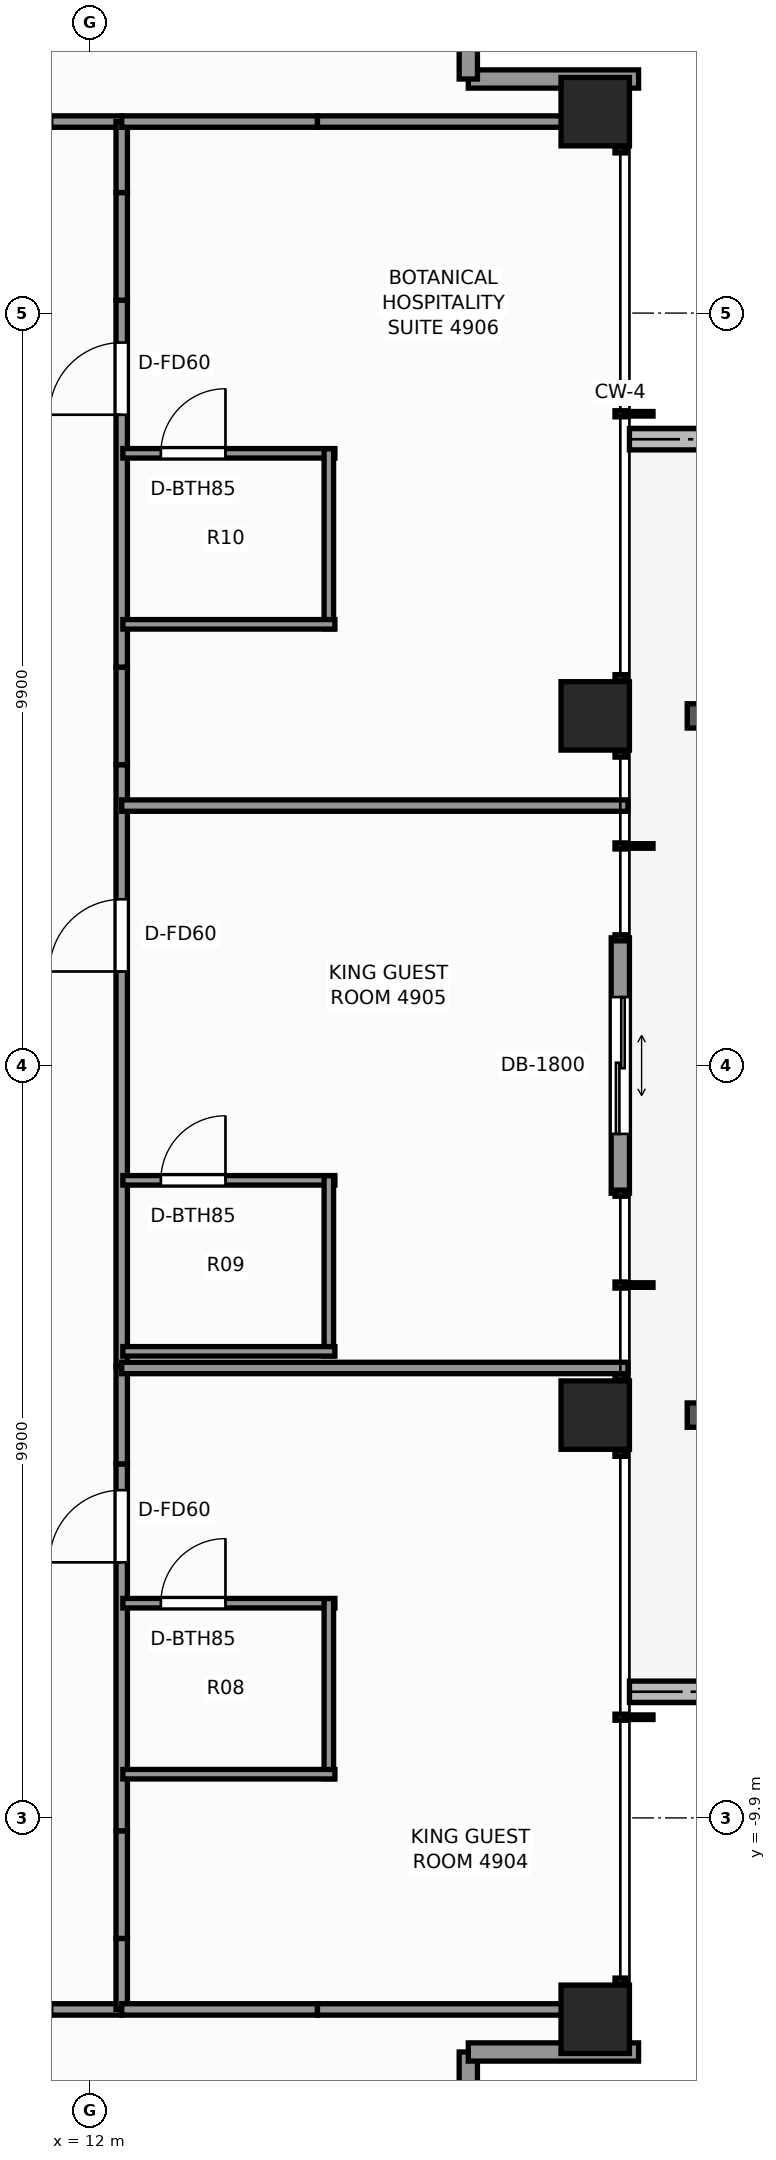
"""IFC4 building model, lengths in metres.
Left out: names, types, materials, properties, quantities, classifications, styles, units other than length and angle.
Written with IfcOpenShell. Run it as: python <this file> out.ifc"""

import sys

from ifc_helpers import new_model, si_unit, direction, frame, frame_2d, origin, origin_2d, place, context, subcontext, project, spatial, rectangle, extrude, element, fill, save


model = new_model("IFC4")
c1 = context("Model", 3, precision=1e-05, world=origin(), true_north=direction((0.0, 1.0)))
c2 = subcontext(c1, "Body", "Model", "MODEL_VIEW")
j1 = project(units=[si_unit("LENGTHUNIT", "METRE"), si_unit("PLANEANGLEUNIT", "RADIAN")], contexts=[c1])
p1 = place(None, origin())
s1 = spatial("IfcSite", under=j1, at=p1, CompositionType="ELEMENT")
p2 = place(p1, origin())
s2 = spatial("IfcBuilding", under=s1, at=p2, CompositionType="ELEMENT")
p3 = place(p2, frame((0.0, 0.0, 170.1)))
s3 = spatial("IfcBuildingStorey", under=s2, at=p3, CompositionType="ELEMENT", Elevation=170.1)
for number, where, z_axis, x_axis in (
    (1, (18.65, -12.55, 0.0), (0.0, 0.0, 1.0), (1.0, 0.0, 0.0)),
    (2, (18.65, -4.6, 0.0), (0.0, 0.0, 1.0), (1.0, 0.0, 0.0)),
    (3, (18.65, 4.6, 0.0), (0.0, 0.0, 1.0), (1.0, 0.0, 0.0)),
    (4, (18.65, 12.55, 0.0), (0.0, 0.0, 1.0), (1.0, 0.0, 0.0)),
):
    element("IfcColumn", number, at=place(p3, frame(where, z_axis=z_axis, x_axis=x_axis)), inside=s3, PredefinedType="COLUMN", context=c2, shape_type="SweptSolid", body=[
        extrude(rectangle(XDim=0.9, YDim=0.9, at=origin_2d()), origin(), (0.0, 0.0, 1.0), 3.3),
    ])
p4 = place(p3, frame((22.075, 8.24, -0.02), z_axis=(0.0, 0.0, 1.0), x_axis=(-1.0, 0.0, 0.0)))
e5 = element("IfcWall", 5, at=p4, inside=s3, PredefinedType="PARAPET", context=c2, shape_type="SweptSolid", body=[
    extrude(rectangle(XDim=2.975, YDim=0.28, at=frame_2d((1.487, 0.0))), origin(), (0.0, 0.0, 1.0), 0.42),
])
p5 = place(p3, frame((19.1, -8.24, -0.02), z_axis=(0.0, 0.0, 1.0), x_axis=(1.0, 0.0, 0.0)))
e6 = element("IfcWall", 6, at=p5, inside=s3, PredefinedType="PARAPET", context=c2, shape_type="SweptSolid", body=[
    extrude(rectangle(XDim=3.42, YDim=0.28, at=frame_2d((1.71, 0.0))), origin(), (0.0, 0.0, 1.0), 0.42),
])
for number, where, z_axis, x_axis in (
    (7, (16.98, -12.98, 0.0), (0.0, 0.0, 1.0), (0.0, -1.0, 0.0)),
    (8, (19.22, -12.98, 0.0), (0.0, 0.0, 1.0), (-1.0, 0.0, 0.0)),
):
    element("IfcWall", number, at=place(p3, frame(where, z_axis=z_axis, x_axis=x_axis)), inside=s3, PredefinedType="STANDARD", context=c2, shape_type="SweptSolid", body=[
        extrude(rectangle(XDim=2.24, YDim=0.24, at=frame_2d((1.12, 0.0))), origin(), (0.0, 0.0, 1.0), 1.275),
    ])
p6 = place(p3, frame((18.98, 1.68, 0.0), z_axis=(0.0, 0.0, 1.0), x_axis=(0.0, -1.0, 0.0)))
e9 = element("IfcWall", 9, at=p6, inside=s3, PredefinedType="STANDARD", context=c2, shape_type="SweptSolid", body=[
    extrude(rectangle(XDim=3.36, YDim=0.24, at=frame_2d((1.68, 0.0))), origin(), (0.0, 0.0, 1.0), 2.615),
])
p7 = place(p6, frame((0.78, 0.0, 0.0)))
e10 = element("IfcOpeningElement", 10, at=p7, cuts=e9, PredefinedType="OPENING", context=c2, shape_type="SweptSolid", body=[
    extrude(rectangle(XDim=1.8, YDim=2.2, at=frame_2d((0.9, 1.1))), frame((0.0, 0.13, 0.0), z_axis=(0.0, -1.0, 0.0), x_axis=(1.0, 0.0, 0.0)), (0.0, 0.0, 1.0), 0.26),
])
for number, where, z_axis, x_axis in (
    (11, (16.98, 12.98, 0.0), (0.0, 0.0, 1.0), (1.0, 0.0, 0.0)),
    (12, (16.98, 15.22, 0.0), (0.0, 0.0, 1.0), (0.0, -1.0, 0.0)),
):
    element("IfcWall", number, at=place(p3, frame(where, z_axis=z_axis, x_axis=x_axis)), inside=s3, PredefinedType="STANDARD", context=c2, shape_type="SweptSolid", body=[
        extrude(rectangle(XDim=2.24, YDim=0.24, at=frame_2d((1.12, 0.0))), origin(), (0.0, 0.0, 1.0), 1.275),
    ])
for number, where, z_axis, x_axis in (
    (13, (11.486, -12.42, 0.0), (0.0, 0.0, 1.0), (1.0, 0.0, 0.0)),
    (14, (11.486, 12.42, 0.0), (0.0, 0.0, 1.0), (1.0, 0.0, 0.0)),
    (15, (12.42, -12.42, 0.0), (0.0, 0.0, 1.0), (0.0, 1.0, 0.0)),
):
    element("IfcWall", number, at=place(p3, frame(where, z_axis=z_axis, x_axis=x_axis)), inside=s3, PredefinedType="PARTITIONING", context=c2, shape_type="SweptSolid", body=[
        extrude(rectangle(XDim=0.934, YDim=0.15, at=frame_2d((0.467, 0.0))), origin(), (0.0, 0.0, 1.0), 3.08),
    ])
p8 = place(p3, frame((12.42, -11.486, 0.0), z_axis=(0.0, 0.0, 1.0), x_axis=(0.0, 1.0, 0.0)))
e16 = element("IfcWall", 16, at=p8, inside=s3, PredefinedType="PARTITIONING", context=c2, shape_type="SweptSolid", body=[
    extrude(rectangle(XDim=1.417, YDim=0.15, at=frame_2d((0.708, 0.0))), origin(), (0.0, 0.0, 1.0), 1.265),
])
p9 = place(p3, frame((12.42, -10.069, 0.0), z_axis=(0.0, 0.0, 1.0), x_axis=(0.0, 1.0, 0.0)))
e17 = element("IfcWall", 17, at=p9, inside=s3, PredefinedType="PARTITIONING", context=c2, shape_type="SweptSolid", body=[
    extrude(rectangle(XDim=4.827, YDim=0.15, at=frame_2d((2.414, 0.0))), origin(), (0.0, 0.0, 1.0), 3.08),
])
p10 = place(p9, frame((3.532, 0.0, 0.0)))
e18 = element("IfcOpeningElement", 18, at=p10, cuts=e17, PredefinedType="OPENING", context=c2, shape_type="SweptSolid", body=[
    extrude(rectangle(XDim=0.95, YDim=2.06, at=frame_2d((0.475, 1.03))), frame((0.0, 0.085, 0.0), z_axis=(0.0, -1.0, 0.0), x_axis=(1.0, 0.0, 0.0)), (0.0, 0.0, 1.0), 0.17),
])
p11 = place(p3, frame((12.42, -5.242, 0.0), z_axis=(0.0, 0.0, 1.0), x_axis=(0.0, 1.0, 0.0)))
e19 = element("IfcWall", 19, at=p11, inside=s3, PredefinedType="PARTITIONING", context=c2, shape_type="SweptSolid", body=[
    extrude(rectangle(XDim=1.284, YDim=0.15, at=frame_2d((0.642, 0.0))), origin(), (0.0, 0.0, 1.0), 1.265),
])
p12 = place(p3, frame((12.42, -3.958, 0.0), z_axis=(0.0, 0.0, 1.0), x_axis=(0.0, 1.0, 0.0)))
e20 = element("IfcWall", 20, at=p12, inside=s3, PredefinedType="PARTITIONING", context=c2, shape_type="SweptSolid", body=[
    extrude(rectangle(XDim=7.916, YDim=0.15, at=frame_2d((3.958, 0.0))), origin(), (0.0, 0.0, 1.0), 2.605),
])
p13 = place(p12, frame((5.195, 0.0, 0.0)))
e21 = element("IfcOpeningElement", 21, at=p13, cuts=e20, PredefinedType="OPENING", context=c2, shape_type="SweptSolid", body=[
    extrude(rectangle(XDim=0.95, YDim=2.06, at=frame_2d((0.475, 1.03))), frame((0.0, 0.085, 0.0), z_axis=(0.0, -1.0, 0.0), x_axis=(1.0, 0.0, 0.0)), (0.0, 0.0, 1.0), 0.17),
])
p14 = place(p3, frame((12.42, 3.958, 0.0), z_axis=(0.0, 0.0, 1.0), x_axis=(0.0, 1.0, 0.0)))
e22 = element("IfcWall", 22, at=p14, inside=s3, PredefinedType="PARTITIONING", context=c2, shape_type="SweptSolid", body=[
    extrude(rectangle(XDim=1.284, YDim=0.15, at=frame_2d((0.642, 0.0))), origin(), (0.0, 0.0, 1.0), 1.265),
])
p15 = place(p3, frame((12.42, 5.242, 0.0), z_axis=(0.0, 0.0, 1.0), x_axis=(0.0, 1.0, 0.0)))
e23 = element("IfcWall", 23, at=p15, inside=s3, PredefinedType="PARTITIONING", context=c2, shape_type="SweptSolid", body=[
    extrude(rectangle(XDim=4.827, YDim=0.15, at=frame_2d((2.414, 0.0))), origin(), (0.0, 0.0, 1.0), 3.08),
])
p16 = place(p15, frame((3.321, 0.0, 0.0)))
e24 = element("IfcOpeningElement", 24, at=p16, cuts=e23, PredefinedType="OPENING", context=c2, shape_type="SweptSolid", body=[
    extrude(rectangle(XDim=0.95, YDim=2.06, at=frame_2d((0.475, 1.03))), frame((0.0, 0.085, 0.0), z_axis=(0.0, -1.0, 0.0), x_axis=(1.0, 0.0, 0.0)), (0.0, 0.0, 1.0), 0.17),
])
p17 = place(p3, frame((12.42, 10.069, 0.0), z_axis=(0.0, 0.0, 1.0), x_axis=(0.0, 1.0, 0.0)))
e25 = element("IfcWall", 25, at=p17, inside=s3, PredefinedType="PARTITIONING", context=c2, shape_type="SweptSolid", body=[
    extrude(rectangle(XDim=1.417, YDim=0.15, at=frame_2d((0.708, 0.0))), origin(), (0.0, 0.0, 1.0), 1.265),
])
p18 = place(p3, frame((12.42, 11.486, 0.0), z_axis=(0.0, 0.0, 1.0), x_axis=(0.0, 1.0, 0.0)))
e26 = element("IfcWall", 26, at=p18, inside=s3, PredefinedType="PARTITIONING", context=c2, shape_type="SweptSolid", body=[
    extrude(rectangle(XDim=0.934, YDim=0.15, at=frame_2d((0.467, 0.0))), origin(), (0.0, 0.0, 1.0), 3.08),
])
p19 = place(p3, frame((12.42, -12.42, 0.0), z_axis=(0.0, 0.0, 1.0), x_axis=(1.0, 0.0, 0.0)))
e27 = element("IfcWall", 27, at=p19, inside=s3, PredefinedType="PARTITIONING", context=c2, shape_type="SweptSolid", body=[
    extrude(rectangle(XDim=2.575, YDim=0.15, at=frame_2d((1.288, 0.0))), origin(), (0.0, 0.0, 1.0), 3.08),
])
p20 = place(p3, frame((14.995, -12.42, 0.0), z_axis=(0.0, 0.0, 1.0), x_axis=(1.0, 0.0, 0.0)))
e28 = element("IfcWall", 28, at=p20, inside=s3, PredefinedType="PARTITIONING", context=c2, shape_type="SweptSolid", body=[
    extrude(rectangle(XDim=4.085, YDim=0.15, at=frame_2d((2.042, 0.0))), origin(), (0.0, 0.0, 1.0), 1.265),
])
p21 = place(p3, frame((12.42, 12.42, 0.0), z_axis=(0.0, 0.0, 1.0), x_axis=(1.0, 0.0, 0.0)))
e29 = element("IfcWall", 29, at=p21, inside=s3, PredefinedType="PARTITIONING", context=c2, shape_type="SweptSolid", body=[
    extrude(rectangle(XDim=2.575, YDim=0.15, at=frame_2d((1.288, 0.0))), origin(), (0.0, 0.0, 1.0), 3.08),
])
p22 = place(p3, frame((14.995, 12.42, 0.0), z_axis=(0.0, 0.0, 1.0), x_axis=(1.0, 0.0, 0.0)))
e30 = element("IfcWall", 30, at=p22, inside=s3, PredefinedType="PARTITIONING", context=c2, shape_type="SweptSolid", body=[
    extrude(rectangle(XDim=4.085, YDim=0.15, at=frame_2d((2.042, 0.0))), origin(), (0.0, 0.0, 1.0), 1.265),
])
p23 = place(p3, frame((12.42, -3.98, 0.0), z_axis=(0.0, 0.0, 1.0), x_axis=(1.0, 0.0, 0.0)))
e31 = element("IfcWall", 31, at=p23, inside=s3, PredefinedType="PARTITIONING", context=c2, shape_type="SweptSolid", body=[
    extrude(rectangle(XDim=6.66, YDim=0.15, at=frame_2d((3.33, 0.0))), origin(), (0.0, 0.0, 1.0), 1.265),
])
p24 = place(p3, frame((12.435, -7.075, 0.0), z_axis=(0.0, 0.0, 1.0), x_axis=(1.0, 0.0, 0.0)))
e32 = element("IfcWall", 32, at=p24, inside=s3, PredefinedType="PARTITIONING", context=c2, shape_type="SweptSolid", body=[
    extrude(rectangle(XDim=2.79, YDim=0.125, at=frame_2d((1.395, 0.0))), origin(), (0.0, 0.0, 1.0), 3.08),
])
p25 = place(p24, frame((0.5, 0.0, 0.0)))
e33 = element("IfcOpeningElement", 33, at=p25, cuts=e32, PredefinedType="OPENING", context=c2, shape_type="SweptSolid", body=[
    extrude(rectangle(XDim=0.85, YDim=2.03, at=frame_2d((0.425, 1.015))), frame((0.0, 0.073, 0.0), z_axis=(0.0, -1.0, 0.0), x_axis=(1.0, 0.0, 0.0)), (0.0, 0.0, 1.0), 0.145),
])
p26 = place(p3, frame((15.145, -9.385, 0.0), z_axis=(0.0, 0.0, 1.0), x_axis=(0.0, 1.0, 0.0)))
e34 = element("IfcWall", 34, at=p26, inside=s3, PredefinedType="PARTITIONING", context=c2, shape_type="SweptSolid", body=[
    extrude(rectangle(XDim=2.37, YDim=0.125, at=frame_2d((1.185, 0.0))), origin(), (0.0, 0.0, 1.0), 3.08),
])
p27 = place(p3, frame((12.435, -9.325, 0.0), z_axis=(0.0, 0.0, 1.0), x_axis=(1.0, 0.0, 0.0)))
e35 = element("IfcWall", 35, at=p27, inside=s3, PredefinedType="PARTITIONING", context=c2, shape_type="SweptSolid", body=[
    extrude(rectangle(XDim=2.79, YDim=0.125, at=frame_2d((1.395, 0.0))), origin(), (0.0, 0.0, 1.0), 3.08),
])
p28 = place(p3, frame((12.42, 3.42, 0.0), z_axis=(0.0, 0.0, 1.0), x_axis=(1.0, 0.0, 0.0)))
e36 = element("IfcWall", 36, at=p28, inside=s3, PredefinedType="PARTITIONING", context=c2, shape_type="SweptSolid", body=[
    extrude(rectangle(XDim=6.66, YDim=0.15, at=frame_2d((3.33, 0.0))), origin(), (0.0, 0.0, 1.0), 3.08),
])
p29 = place(p3, frame((12.435, -1.511, 0.0), z_axis=(0.0, 0.0, 1.0), x_axis=(1.0, 0.0, 0.0)))
e37 = element("IfcWall", 37, at=p29, inside=s3, PredefinedType="PARTITIONING", context=c2, shape_type="SweptSolid", body=[
    extrude(rectangle(XDim=2.79, YDim=0.125, at=frame_2d((1.395, 0.0))), origin(), (0.0, 0.0, 1.0), 3.08),
])
p30 = place(p29, frame((0.5, 0.0, 0.0)))
e38 = element("IfcOpeningElement", 38, at=p30, cuts=e37, PredefinedType="OPENING", context=c2, shape_type="SweptSolid", body=[
    extrude(rectangle(XDim=0.85, YDim=2.03, at=frame_2d((0.425, 1.015))), frame((0.0, 0.073, 0.0), z_axis=(0.0, -1.0, 0.0), x_axis=(1.0, 0.0, 0.0)), (0.0, 0.0, 1.0), 0.145),
])
p31 = place(p3, frame((15.145, -3.821, 0.0), z_axis=(0.0, 0.0, 1.0), x_axis=(0.0, 1.0, 0.0)))
e39 = element("IfcWall", 39, at=p31, inside=s3, PredefinedType="PARTITIONING", context=c2, shape_type="SweptSolid", body=[
    extrude(rectangle(XDim=2.37, YDim=0.125, at=frame_2d((1.185, 0.0))), origin(), (0.0, 0.0, 1.0), 3.08),
])
p32 = place(p3, frame((12.435, -3.761, 0.0), z_axis=(0.0, 0.0, 1.0), x_axis=(1.0, 0.0, 0.0)))
e40 = element("IfcWall", 40, at=p32, inside=s3, PredefinedType="PARTITIONING", context=c2, shape_type="SweptSolid", body=[
    extrude(rectangle(XDim=2.79, YDim=0.125, at=frame_2d((1.395, 0.0))), origin(), (0.0, 0.0, 1.0), 3.08),
])
p33 = place(p3, frame((12.435, 8.055, 0.0), z_axis=(0.0, 0.0, 1.0), x_axis=(1.0, 0.0, 0.0)))
e41 = element("IfcWall", 41, at=p33, inside=s3, PredefinedType="PARTITIONING", context=c2, shape_type="SweptSolid", body=[
    extrude(rectangle(XDim=2.79, YDim=0.125, at=frame_2d((1.395, 0.0))), origin(), (0.0, 0.0, 1.0), 3.08),
])
p34 = place(p33, frame((0.5, 0.0, 0.0)))
e42 = element("IfcOpeningElement", 42, at=p34, cuts=e41, PredefinedType="OPENING", context=c2, shape_type="SweptSolid", body=[
    extrude(rectangle(XDim=0.85, YDim=2.03, at=frame_2d((0.425, 1.015))), frame((0.0, 0.073, 0.0), z_axis=(0.0, -1.0, 0.0), x_axis=(1.0, 0.0, 0.0)), (0.0, 0.0, 1.0), 0.145),
])
p35 = place(p3, frame((15.145, 5.745, 0.0), z_axis=(0.0, 0.0, 1.0), x_axis=(0.0, 1.0, 0.0)))
e43 = element("IfcWall", 43, at=p35, inside=s3, PredefinedType="PARTITIONING", context=c2, shape_type="SweptSolid", body=[
    extrude(rectangle(XDim=2.37, YDim=0.125, at=frame_2d((1.185, 0.0))), origin(), (0.0, 0.0, 1.0), 3.08),
])
p36 = place(p3, frame((12.435, 5.805, 0.0), z_axis=(0.0, 0.0, 1.0), x_axis=(1.0, 0.0, 0.0)))
e44 = element("IfcWall", 44, at=p36, inside=s3, PredefinedType="PARTITIONING", context=c2, shape_type="SweptSolid", body=[
    extrude(rectangle(XDim=2.79, YDim=0.125, at=frame_2d((1.395, 0.0))), origin(), (0.0, 0.0, 1.0), 3.08),
])
p37 = place(p7, origin())
e45 = element("IfcDoor", 45, at=p37, inside=s3, OperationType="DOUBLE_DOOR_SLIDING", PredefinedType="DOOR", context=c2, shape_type="SweptSolid", body=[
    extrude(rectangle(XDim=1.8, YDim=2.2, at=frame_2d((0.9, 1.1))), frame((0.0, 0.025, 0.0), z_axis=(0.0, -1.0, 0.0), x_axis=(1.0, 0.0, 0.0)), (0.0, 0.0, 1.0), 0.05),
])
fill(e10, e45)
p38 = place(p25, origin())
e46 = element("IfcDoor", 46, at=p38, inside=s3, OperationType="SINGLE_SWING_RIGHT", PredefinedType="DOOR", context=c2, shape_type="SweptSolid", body=[
    extrude(rectangle(XDim=0.85, YDim=2.03, at=frame_2d((0.425, 1.015))), frame((0.0, 0.025, 0.0), z_axis=(0.0, -1.0, 0.0), x_axis=(1.0, 0.0, 0.0)), (0.0, 0.0, 1.0), 0.05),
])
fill(e33, e46)
p39 = place(p10, origin())
e47 = element("IfcDoor", 47, at=p39, inside=s3, OperationType="SINGLE_SWING_LEFT", PredefinedType="DOOR", context=c2, shape_type="SweptSolid", body=[
    extrude(rectangle(XDim=0.95, YDim=2.06, at=frame_2d((0.475, 1.03))), frame((0.0, 0.025, 0.0), z_axis=(0.0, -1.0, 0.0), x_axis=(1.0, 0.0, 0.0)), (0.0, 0.0, 1.0), 0.05),
])
fill(e18, e47)
p40 = place(p30, origin())
e48 = element("IfcDoor", 48, at=p40, inside=s3, OperationType="SINGLE_SWING_RIGHT", PredefinedType="DOOR", context=c2, shape_type="SweptSolid", body=[
    extrude(rectangle(XDim=0.85, YDim=2.03, at=frame_2d((0.425, 1.015))), frame((0.0, 0.025, 0.0), z_axis=(0.0, -1.0, 0.0), x_axis=(1.0, 0.0, 0.0)), (0.0, 0.0, 1.0), 0.05),
])
fill(e38, e48)
p41 = place(p13, origin())
e49 = element("IfcDoor", 49, at=p41, inside=s3, OperationType="SINGLE_SWING_LEFT", PredefinedType="DOOR", context=c2, shape_type="SweptSolid", body=[
    extrude(rectangle(XDim=0.95, YDim=2.06, at=frame_2d((0.475, 1.03))), frame((0.0, 0.025, 0.0), z_axis=(0.0, -1.0, 0.0), x_axis=(1.0, 0.0, 0.0)), (0.0, 0.0, 1.0), 0.05),
])
fill(e21, e49)
p42 = place(p34, origin())
e50 = element("IfcDoor", 50, at=p42, inside=s3, OperationType="SINGLE_SWING_RIGHT", PredefinedType="DOOR", context=c2, shape_type="SweptSolid", body=[
    extrude(rectangle(XDim=0.85, YDim=2.03, at=frame_2d((0.425, 1.015))), frame((0.0, 0.025, 0.0), z_axis=(0.0, -1.0, 0.0), x_axis=(1.0, 0.0, 0.0)), (0.0, 0.0, 1.0), 0.05),
])
fill(e42, e50)
p43 = place(p16, origin())
e51 = element("IfcDoor", 51, at=p43, inside=s3, OperationType="SINGLE_SWING_LEFT", PredefinedType="DOOR", context=c2, shape_type="SweptSolid", body=[
    extrude(rectangle(XDim=0.95, YDim=2.06, at=frame_2d((0.475, 1.03))), frame((0.0, 0.025, 0.0), z_axis=(0.0, -1.0, 0.0), x_axis=(1.0, 0.0, 0.0)), (0.0, 0.0, 1.0), 0.05),
])
fill(e24, e51)
save(model, sys.argv[1])
